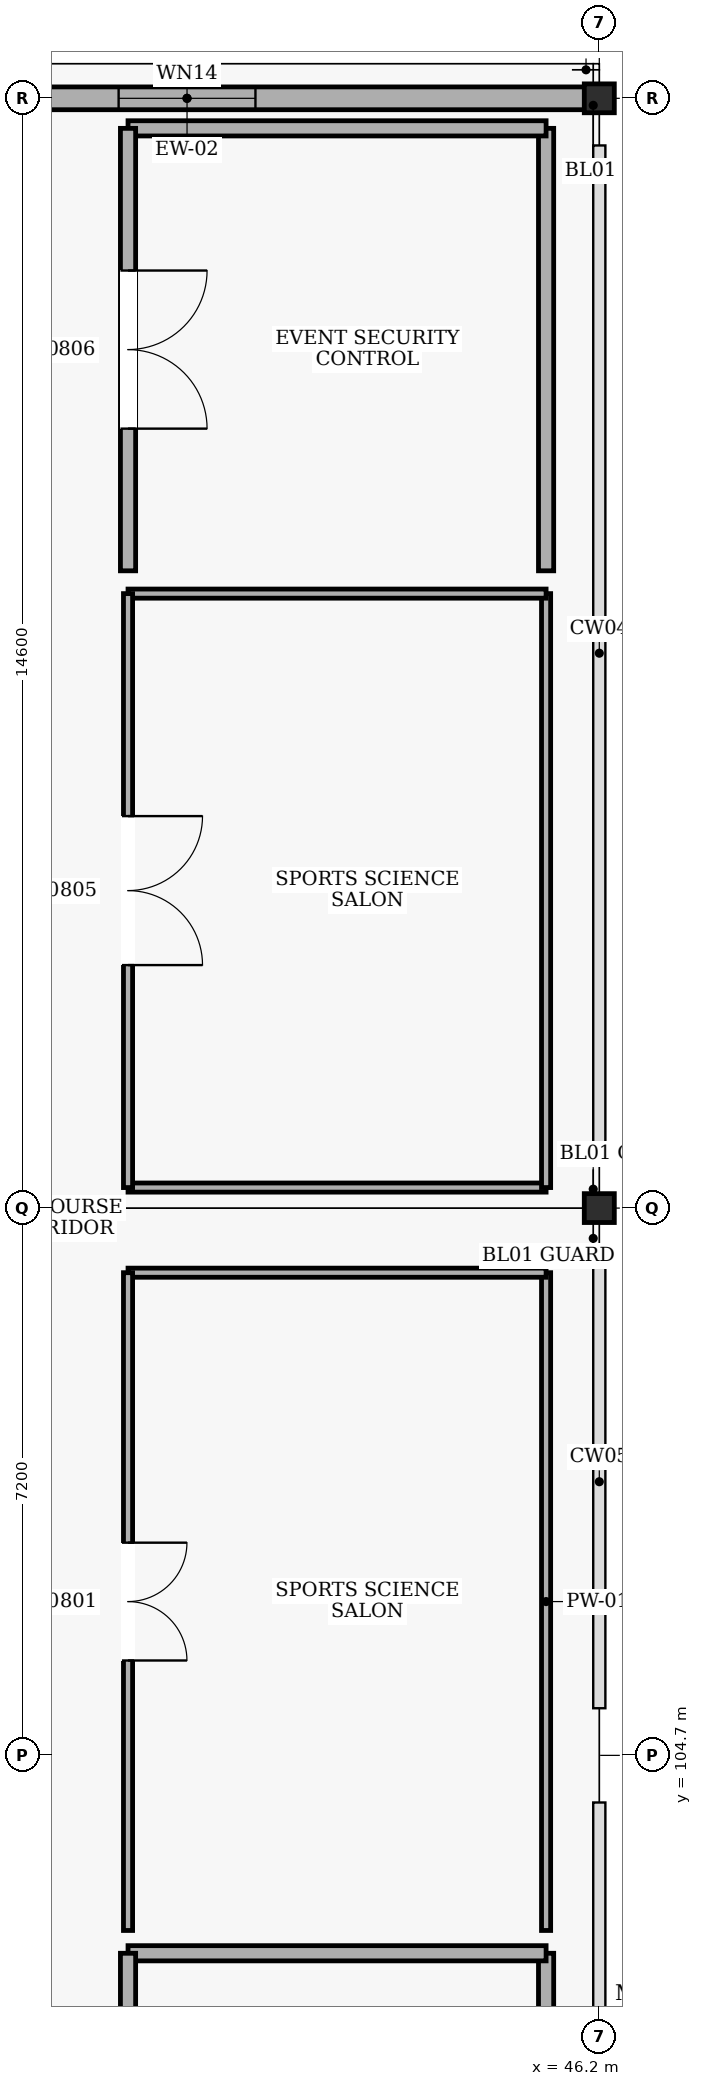
"""IFC4 building model, lengths in metres.
Left out: names, types, materials, properties, quantities, classifications, styles, units other than length and angle.
Written with IfcOpenShell. Run it as: python <this file> out.ifc"""

import sys

from ifc_helpers import new_model, si_unit, direction, frame, frame_2d, origin, origin_2d, place, context, subcontext, project, spatial, rectangle, i_section, extrude, element, fill, save


model = new_model("IFC4")
c1 = context("Model", 3, precision=1e-05, world=origin(), true_north=direction((0.0, 1.0)))
c2 = subcontext(c1, "Body", "Model", "MODEL_VIEW")
j1 = project(units=[si_unit("LENGTHUNIT", "METRE"), si_unit("PLANEANGLEUNIT", "RADIAN")], contexts=[c1])
p1 = place(None, origin())
s1 = spatial("IfcSite", under=j1, at=p1, CompositionType="ELEMENT")
p2 = place(p1, origin())
s2 = spatial("IfcBuilding", under=s1, at=p2, CompositionType="ELEMENT")
p3 = place(p2, frame((0.0, 0.0, 24.6)))
s3 = spatial("IfcBuildingStorey", under=s2, at=p3, CompositionType="ELEMENT", Elevation=24.6)
for number, where, z_axis, x_axis in (
    (1, (46.2, 111.9, 0.0), (0.0, 0.0, 1.0), (1.0, 0.0, 0.0)),
    (2, (46.2, 126.5, 0.0), (0.0, 0.0, 1.0), (1.0, 0.0, 0.0)),
):
    element("IfcColumn", number, at=place(p3, frame(where, z_axis=z_axis, x_axis=x_axis)), inside=s3, PredefinedType="COLUMN", context=c2, shape_type="SweptSolid", body=[
        extrude(i_section(OverallWidth=0.395, OverallDepth=0.38, WebThickness=0.019, FlangeThickness=0.03, at=origin_2d()), origin(), (0.0, 0.0, 1.0), 4.8),
    ])
p4 = place(p3, frame((35.545, 126.5, 0.0), z_axis=(0.0, 0.0, 1.0), x_axis=(1.0, 0.0, 0.0)))
e3 = element("IfcWall", 3, at=p4, inside=s3, PredefinedType="SOLIDWALL", context=c2, shape_type="SweptSolid", body=[
    extrude(rectangle(XDim=10.463, YDim=0.3, at=frame_2d((5.231, 0.0))), origin(), (0.0, 0.0, 1.0), 3.72),
])
p5 = place(p4, frame((4.331, 0.0, 0.9)))
e4 = element("IfcOpeningElement", 4, at=p5, cuts=e3, PredefinedType="OPENING", context=c2, shape_type="SweptSolid", body=[
    extrude(rectangle(XDim=1.8, YDim=2.1, at=frame_2d((0.9, 1.05))), frame((0.0, 0.16, 0.0), z_axis=(0.0, -1.0, 0.0), x_axis=(1.0, 0.0, 0.0)), (0.0, 0.0, 1.0), 0.32),
])
p6 = place(p3, frame((45.5, 92.323, 0.0), z_axis=(0.0, 0.0, 1.0), x_axis=(0.0, 1.0, 0.0)))
e5 = element("IfcWall", 5, at=p6, inside=s3, PredefinedType="PARTITIONING", context=c2, shape_type="SweptSolid", body=[
    extrude(rectangle(XDim=9.773, YDim=0.2, at=frame_2d((4.886, 0.0))), origin(), (0.0, 0.0, 1.0), 4.5),
])
p7 = place(p3, frame((45.5, 102.096, 0.0), z_axis=(0.0, 0.0, 1.0), x_axis=(-1.0, 0.0, 0.0)))
e6 = element("IfcWall", 6, at=p7, inside=s3, PredefinedType="PARTITIONING", context=c2, shape_type="SweptSolid", body=[
    extrude(rectangle(XDim=5.5, YDim=0.2, at=frame_2d((2.75, 0.0))), origin(), (0.0, 0.0, 1.0), 4.5),
])
p8 = place(p3, frame((40.0, 102.096, 0.0), z_axis=(0.0, 0.0, 1.0), x_axis=(0.0, -1.0, 0.0)))
e7 = element("IfcWall", 7, at=p8, inside=s3, PredefinedType="PARTITIONING", context=c2, shape_type="SweptSolid", body=[
    extrude(rectangle(XDim=9.773, YDim=0.2, at=frame_2d((4.886, 0.0))), origin(), (0.0, 0.0, 1.0), 4.5),
])
p9 = place(p8, frame((4.186, 0.0, 0.0)))
e8 = element("IfcOpeningElement", 8, at=p9, cuts=e7, PredefinedType="OPENING", context=c2, shape_type="SweptSolid", body=[
    extrude(rectangle(XDim=1.4, YDim=2.2, at=frame_2d((0.7, 1.1))), frame((0.0, 0.11, 0.0), z_axis=(0.0, -1.0, 0.0), x_axis=(1.0, 0.0, 0.0)), (0.0, 0.0, 1.0), 0.22),
])
p10 = place(p3, frame((45.5, 102.396, 0.0), z_axis=(0.0, 0.0, 1.0), x_axis=(0.0, 1.0, 0.0)))
e9 = element("IfcWall", 9, at=p10, inside=s3, PredefinedType="PARTITIONING", context=c2, shape_type="SweptSolid", body=[
    extrude(rectangle(XDim=8.654, YDim=0.12, at=frame_2d((4.327, 0.0))), origin(), (0.0, 0.0, 1.0), 4.5),
])
p11 = place(p3, frame((45.5, 111.05, 0.0), z_axis=(0.0, 0.0, 1.0), x_axis=(-1.0, 0.0, 0.0)))
e10 = element("IfcWall", 10, at=p11, inside=s3, PredefinedType="PARTITIONING", context=c2, shape_type="SweptSolid", body=[
    extrude(rectangle(XDim=5.5, YDim=0.12, at=frame_2d((2.75, 0.0))), origin(), (0.0, 0.0, 1.0), 4.5),
])
p12 = place(p3, frame((40.0, 111.05, 0.0), z_axis=(0.0, 0.0, 1.0), x_axis=(0.0, -1.0, 0.0)))
e11 = element("IfcWall", 11, at=p12, inside=s3, PredefinedType="PARTITIONING", context=c2, shape_type="SweptSolid", body=[
    extrude(rectangle(XDim=8.654, YDim=0.12, at=frame_2d((4.327, 0.0))), origin(), (0.0, 0.0, 1.0), 4.5),
])
p13 = place(p12, frame((3.552, 0.0, 0.0)))
e12 = element("IfcOpeningElement", 12, at=p13, cuts=e11, PredefinedType="OPENING", context=c2, shape_type="SweptSolid", body=[
    extrude(rectangle(XDim=1.55, YDim=2.2, at=frame_2d((0.775, 1.1))), frame((0.0, 0.07, 0.0), z_axis=(0.0, -1.0, 0.0), x_axis=(1.0, 0.0, 0.0)), (0.0, 0.0, 1.0), 0.14),
])
p14 = place(p3, frame((40.0, 112.17, 0.0), z_axis=(0.0, 0.0, 1.0), x_axis=(1.0, 0.0, 0.0)))
e13 = element("IfcWall", 13, at=p14, inside=s3, PredefinedType="PARTITIONING", context=c2, shape_type="SweptSolid", body=[
    extrude(rectangle(XDim=5.5, YDim=0.12, at=frame_2d((2.75, 0.0))), origin(), (0.0, 0.0, 1.0), 4.5),
])
p15 = place(p3, frame((45.5, 112.17, 0.0), z_axis=(0.0, 0.0, 1.0), x_axis=(0.0, 1.0, 0.0)))
e14 = element("IfcWall", 14, at=p15, inside=s3, PredefinedType="PARTITIONING", context=c2, shape_type="SweptSolid", body=[
    extrude(rectangle(XDim=7.814, YDim=0.12, at=frame_2d((3.907, 0.0))), origin(), (0.0, 0.0, 1.0), 4.5),
])
p16 = place(p3, frame((45.5, 119.984, 0.0), z_axis=(0.0, 0.0, 1.0), x_axis=(-1.0, 0.0, 0.0)))
e15 = element("IfcWall", 15, at=p16, inside=s3, PredefinedType="PARTITIONING", context=c2, shape_type="SweptSolid", body=[
    extrude(rectangle(XDim=5.5, YDim=0.12, at=frame_2d((2.75, 0.0))), origin(), (0.0, 0.0, 1.0), 4.5),
])
p17 = place(p3, frame((40.0, 119.984, 0.0), z_axis=(0.0, 0.0, 1.0), x_axis=(0.0, -1.0, 0.0)))
e16 = element("IfcWall", 16, at=p17, inside=s3, PredefinedType="PARTITIONING", context=c2, shape_type="SweptSolid", body=[
    extrude(rectangle(XDim=7.814, YDim=0.12, at=frame_2d((3.907, 0.0))), origin(), (0.0, 0.0, 1.0), 4.5),
])
p18 = place(p17, frame((2.927, 0.0, 0.0)))
e17 = element("IfcOpeningElement", 17, at=p18, cuts=e16, PredefinedType="OPENING", context=c2, shape_type="SweptSolid", body=[
    extrude(rectangle(XDim=1.96, YDim=2.3, at=frame_2d((0.98, 1.15))), frame((0.0, 0.07, 0.0), z_axis=(0.0, -1.0, 0.0), x_axis=(1.0, 0.0, 0.0)), (0.0, 0.0, 1.0), 0.14),
])
p19 = place(p3, frame((45.5, 120.284, 0.0), z_axis=(0.0, 0.0, 1.0), x_axis=(0.0, 1.0, 0.0)))
e18 = element("IfcWall", 18, at=p19, inside=s3, PredefinedType="PARTITIONING", context=c2, shape_type="SweptSolid", body=[
    extrude(rectangle(XDim=5.821, YDim=0.2, at=frame_2d((2.911, 0.0))), origin(), (0.0, 0.0, 1.0), 4.5),
])
p20 = place(p3, frame((45.5, 126.105, 0.0), z_axis=(0.0, 0.0, 1.0), x_axis=(-1.0, 0.0, 0.0)))
e19 = element("IfcWall", 19, at=p20, inside=s3, PredefinedType="PARTITIONING", context=c2, shape_type="SweptSolid", body=[
    extrude(rectangle(XDim=5.5, YDim=0.2, at=frame_2d((2.75, 0.0))), origin(), (0.0, 0.0, 1.0), 3.72),
])
p21 = place(p3, frame((40.0, 126.105, 0.0), z_axis=(0.0, 0.0, 1.0), x_axis=(0.0, -1.0, 0.0)))
e20 = element("IfcWall", 20, at=p21, inside=s3, PredefinedType="PARTITIONING", context=c2, shape_type="SweptSolid", body=[
    extrude(rectangle(XDim=5.821, YDim=0.2, at=frame_2d((2.911, 0.0))), origin(), (0.0, 0.0, 1.0), 4.5),
])
p22 = place(p21, frame((1.871, 0.0, 0.0)))
e21 = element("IfcOpeningElement", 21, at=p22, cuts=e20, PredefinedType="OPENING", context=c2, shape_type="SweptSolid", body=[
    extrude(rectangle(XDim=2.08, YDim=2.35, at=frame_2d((1.04, 1.175))), frame((0.0, 0.11, 0.0), z_axis=(0.0, -1.0, 0.0), x_axis=(1.0, 0.0, 0.0)), (0.0, 0.0, 1.0), 0.22),
])
p23 = place(p5, origin())
e22 = element("IfcWindow", 22, at=p23, inside=s3, PartitioningType="SINGLE_PANEL", PredefinedType="WINDOW", context=c2, shape_type="SweptSolid", body=[
    extrude(rectangle(XDim=1.8, YDim=2.1, at=frame_2d((0.9, 1.05))), frame((0.0, 0.03, 0.0), z_axis=(0.0, -1.0, 0.0), x_axis=(1.0, 0.0, 0.0)), (0.0, 0.0, 1.0), 0.06),
])
fill(e4, e22)
p24 = place(p13, origin())
e23 = element("IfcDoor", 23, at=p24, inside=s3, OperationType="DOUBLE_DOOR_SINGLE_SWING", PredefinedType="DOOR", context=c2, shape_type="SweptSolid", body=[
    extrude(rectangle(XDim=1.55, YDim=2.2, at=frame_2d((0.775, 1.1))), frame((0.0, 0.025, 0.0), z_axis=(0.0, -1.0, 0.0), x_axis=(1.0, 0.0, 0.0)), (0.0, 0.0, 1.0), 0.05),
])
fill(e12, e23)
p25 = place(p18, origin())
e24 = element("IfcDoor", 24, at=p25, inside=s3, OperationType="DOUBLE_DOOR_SINGLE_SWING", PredefinedType="DOOR", context=c2, shape_type="SweptSolid", body=[
    extrude(rectangle(XDim=1.96, YDim=2.3, at=frame_2d((0.98, 1.15))), frame((0.0, 0.025, 0.0), z_axis=(0.0, -1.0, 0.0), x_axis=(1.0, 0.0, 0.0)), (0.0, 0.0, 1.0), 0.05),
])
fill(e17, e24)
p26 = place(p22, origin())
e25 = element("IfcDoor", 25, at=p26, inside=s3, OperationType="DOUBLE_DOOR_SINGLE_SWING", PredefinedType="DOOR", context=c2, shape_type="SweptSolid", body=[
    extrude(rectangle(XDim=2.08, YDim=2.35, at=frame_2d((1.04, 1.175))), frame((0.0, 0.025, 0.0), z_axis=(0.0, -1.0, 0.0), x_axis=(1.0, 0.0, 0.0)), (0.0, 0.0, 1.0), 0.05),
])
fill(e21, e25)
save(model, sys.argv[1])
